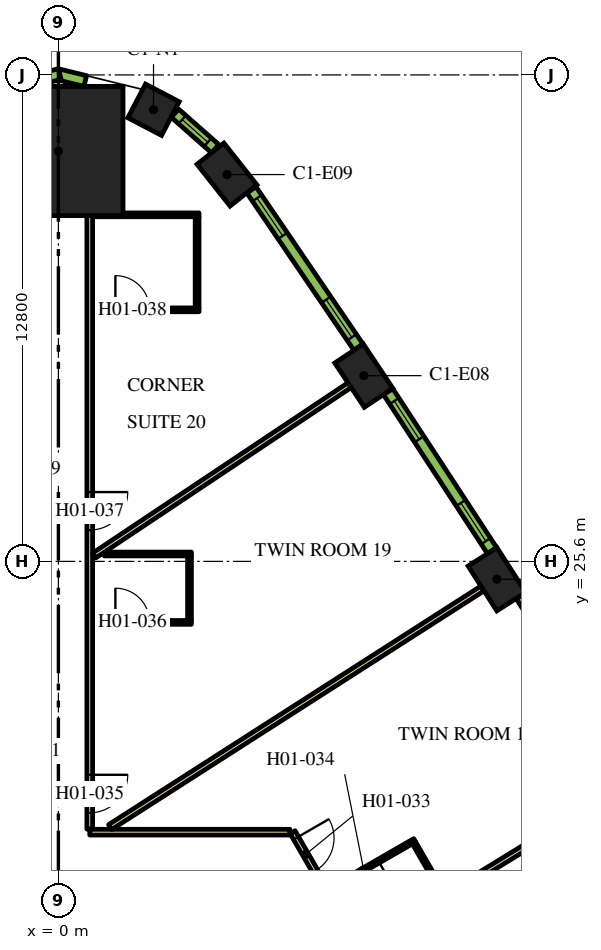
"""IFC4 building model, lengths in metres.
Left out: names, types, materials, properties, quantities, classifications, styles, units other than length and angle.
Written with IfcOpenShell. Run it as: python <this file> out.ifc"""

import sys

from ifc_helpers import new_model, si_unit, direction, frame, frame_2d, origin, origin_2d, place, context, subcontext, project, spatial, rectangle, extrude, element, fill, save


model = new_model("IFC4")
c1 = context("Model", 3, precision=1e-05, world=origin(), true_north=direction((0.0, 1.0)))
c2 = subcontext(c1, "Body", "Model", "MODEL_VIEW")
j1 = project(units=[si_unit("LENGTHUNIT", "METRE"), si_unit("PLANEANGLEUNIT", "RADIAN")], contexts=[c1])
p1 = place(None, origin())
s1 = spatial("IfcSite", under=j1, at=p1, CompositionType="ELEMENT")
p2 = place(p1, origin())
s2 = spatial("IfcBuilding", under=s1, at=p2, CompositionType="ELEMENT")
p3 = place(p2, frame((0.0, 0.0, 27.6)))
s3 = spatial("IfcBuildingStorey", under=s2, at=p3, CompositionType="ELEMENT", Elevation=27.6)
p4 = place(p3, frame((0.0, 36.399, 0.0), z_axis=(0.0, 0.0, 1.0), x_axis=(0.0, 1.0, 0.0)))
e1 = element("IfcColumn", 1, at=p4, inside=s3, PredefinedType="COLUMN", context=c2, shape_type="SweptSolid", body=[
    extrude(rectangle(XDim=3.4, YDim=3.4, at=origin_2d()), origin(), (0.0, 0.0, 1.0), 3.9),
])
for number, where, z_axis, x_axis in (
    (2, (11.539, 25.131, 0.0), (0.0, 0.0, 1.0), (-0.539, 0.842, 0.0)),
    (3, (8.037, 30.487, 0.0), (0.0, 0.0, 1.0), (-0.555, 0.832, 0.0)),
    (4, (4.436, 35.778, 0.0), (0.0, 0.0, 1.0), (-0.62, 0.784, 0.0)),
):
    element("IfcColumn", number, at=place(p3, frame(where, z_axis=z_axis, x_axis=x_axis)), inside=s3, PredefinedType="COLUMN", context=c2, shape_type="SweptSolid", body=[
        extrude(rectangle(XDim=1.4, YDim=0.9, at=origin_2d()), origin(), (0.0, 0.0, 1.0), 3.9),
    ])
p5 = place(p3, frame((2.503, 37.484, 0.0), z_axis=(0.0, 0.0, 1.0), x_axis=(-0.886067695645, 0.463555863661, 0.0)))
e5 = element("IfcColumn", 5, at=p5, inside=s3, PredefinedType="COLUMN", context=c2, shape_type="SweptSolid", body=[
    extrude(rectangle(XDim=1.0, YDim=1.0, at=origin_2d()), origin(), (0.0, 0.0, 1.0), 3.9),
])
p6 = place(p3, frame((6.163, 18.475, 0.0), z_axis=(0.0, 0.0, 1.0), x_axis=(0.500001317485, -0.866024643133, 0.0)))
e6 = element("IfcWall", 6, at=p6, inside=s3, PredefinedType="PARTITIONING", context=c2, shape_type="SweptSolid", body=[
    extrude(rectangle(XDim=25.767, YDim=0.15, at=frame_2d((12.883, 0.0))), origin(), (0.0, 0.0, 1.0), 2.75),
])
p7 = place(p6, frame((24.586, 0.0, 0.0)))
e7 = element("IfcOpeningElement", 7, at=p7, cuts=e6, PredefinedType="OPENING", context=c2, shape_type="SweptSolid", body=[
    extrude(rectangle(XDim=1.0, YDim=2.1, at=frame_2d((0.5, 1.05))), frame((0.0, 0.085, 0.0), z_axis=(0.0, -1.0, 0.0), x_axis=(1.0, 0.0, 0.0)), (0.0, 0.0, 1.0), 0.17),
])
p8 = place(p6, frame((19.319, 0.0, 0.0)))
e8 = element("IfcOpeningElement", 8, at=p8, cuts=e6, PredefinedType="OPENING", context=c2, shape_type="SweptSolid", body=[
    extrude(rectangle(XDim=1.0, YDim=2.1, at=frame_2d((0.5, 1.05))), frame((0.0, 0.085, 0.0), z_axis=(0.0, -1.0, 0.0), x_axis=(1.0, 0.0, 0.0)), (0.0, 0.0, 1.0), 0.17),
])
p9 = place(p6, frame((18.012, 0.0, 0.0)))
e9 = element("IfcOpeningElement", 9, at=p9, cuts=e6, PredefinedType="OPENING", context=c2, shape_type="SweptSolid", body=[
    extrude(rectangle(XDim=1.0, YDim=2.1, at=frame_2d((0.5, 1.05))), frame((0.0, 0.085, 0.0), z_axis=(0.0, -1.0, 0.0), x_axis=(1.0, 0.0, 0.0)), (0.0, 0.0, 1.0), 0.17),
])
p10 = place(p6, frame((6.824, 0.0, 0.0)))
e10 = element("IfcOpeningElement", 10, at=p10, cuts=e6, PredefinedType="OPENING", context=c2, shape_type="SweptSolid", body=[
    extrude(rectangle(XDim=1.1, YDim=2.1, at=frame_2d((0.55, 1.05))), frame((0.0, 0.085, 0.0), z_axis=(0.0, -1.0, 0.0), x_axis=(1.0, 0.0, 0.0)), (0.0, 0.0, 1.0), 0.17),
])
p11 = place(p6, frame((4.658, 0.0, 0.0)))
e11 = element("IfcOpeningElement", 11, at=p11, cuts=e6, PredefinedType="OPENING", context=c2, shape_type="SweptSolid", body=[
    extrude(rectangle(XDim=0.9, YDim=2.1, at=frame_2d((0.45, 1.05))), frame((0.0, 0.085, 0.0), z_axis=(0.0, -1.0, 0.0), x_axis=(1.0, 0.0, 0.0)), (0.0, 0.0, 1.0), 0.17),
])
p12 = place(p6, frame((0.18, 0.0, 0.0)))
e12 = element("IfcOpeningElement", 12, at=p12, cuts=e6, PredefinedType="OPENING", context=c2, shape_type="SweptSolid", body=[
    extrude(rectangle(XDim=1.0, YDim=2.1, at=frame_2d((0.5, 1.05))), frame((0.0, 0.085, 0.0), z_axis=(0.0, -1.0, 0.0), x_axis=(1.0, 0.0, 0.0)), (0.0, 0.0, 1.0), 0.17),
])
p13 = place(p3, frame((0.825, 18.475, 0.0), z_axis=(0.0, 0.0, 1.0), x_axis=(1.0, 0.0, 0.0)))
e13 = element("IfcWall", 13, at=p13, inside=s3, PredefinedType="PARTITIONING", context=c2, shape_type="SweptSolid", body=[
    extrude(rectangle(XDim=5.268, YDim=0.15, at=frame_2d((2.634, 0.0))), origin(), (0.0, 0.0, 1.0), 2.75),
])
p14 = place(p3, frame((0.825, 34.699, 0.0), z_axis=(0.0, 0.0, 1.0), x_axis=(0.0, -1.0, 0.0)))
e14 = element("IfcWall", 14, at=p14, inside=s3, PredefinedType="PARTITIONING", context=c2, shape_type="SweptSolid", body=[
    extrude(rectangle(XDim=16.144, YDim=0.15, at=frame_2d((8.072, 0.0))), origin(), (0.0, 0.0, 1.0), 2.75),
])
p15 = place(p14, frame((14.714, 0.0, 0.0)))
e15 = element("IfcOpeningElement", 15, at=p15, cuts=e14, PredefinedType="OPENING", context=c2, shape_type="SweptSolid", body=[
    extrude(rectangle(XDim=1.0, YDim=2.1, at=frame_2d((0.5, 1.05))), frame((0.0, 0.085, 0.0), z_axis=(0.0, -1.0, 0.0), x_axis=(1.0, 0.0, 0.0)), (0.0, 0.0, 1.0), 0.17),
])
p16 = place(p14, frame((7.275, 0.0, 0.0)))
e16 = element("IfcOpeningElement", 16, at=p16, cuts=e14, PredefinedType="OPENING", context=c2, shape_type="SweptSolid", body=[
    extrude(rectangle(XDim=1.0, YDim=2.1, at=frame_2d((0.5, 1.05))), frame((0.0, 0.085, 0.0), z_axis=(0.0, -1.0, 0.0), x_axis=(1.0, 0.0, 0.0)), (0.0, 0.0, 1.0), 0.17),
])
p17 = place(p3, frame((7.662, 30.238, 0.0), z_axis=(0.0, 0.0, 1.0), x_axis=(-0.831882886825, -0.554951225431, 0.0)))
e17 = element("IfcWall", 17, at=p17, inside=s3, PredefinedType="PARTITIONING", context=c2, shape_type="SweptSolid", body=[
    extrude(rectangle(XDim=8.079, YDim=0.15, at=frame_2d((4.04, 0.0))), origin(), (0.0, 0.0, 1.0), 2.75),
])
p18 = place(p3, frame((11.16, 24.888, 0.0), z_axis=(0.0, 0.0, 1.0), x_axis=(-0.84199813156, -0.539480441211, 0.0)))
e18 = element("IfcWall", 18, at=p18, inside=s3, PredefinedType="PARTITIONING", context=c2, shape_type="SweptSolid", body=[
    extrude(rectangle(XDim=11.638, YDim=0.15, at=frame_2d((5.819, 0.0))), origin(), (0.0, 0.0, 1.0), 2.75),
])
p19 = place(p3, frame((14.558, 19.475, 0.0), z_axis=(0.0, 0.0, 1.0), x_axis=(-0.851829455142, -0.523819223925, 0.0)))
e19 = element("IfcWall", 19, at=p19, inside=s3, PredefinedType="PARTITIONING", context=c2, shape_type="SweptSolid", body=[
    extrude(rectangle(XDim=7.688, YDim=0.15, at=frame_2d((3.844, 0.0))), origin(), (0.0, 0.0, 1.0), 2.75),
])
p20 = place(p3, frame((9.375, 18.261, 0.0), z_axis=(0.0, 0.0, 1.0), x_axis=(-0.866021400173, -0.500006934395, 0.0)))
e20 = element("IfcWall", 20, at=p20, inside=s3, PredefinedType="PARTITIONING", context=c2, shape_type="SweptSolid", body=[
    extrude(rectangle(XDim=2.6, YDim=0.1, at=frame_2d((1.3, 0.0))), origin(), (0.0, 0.0, 1.0), 2.75),
])
p21 = place(p20, frame((1.1, 0.0, 0.0)))
e21 = element("IfcOpeningElement", 21, at=p21, cuts=e20, PredefinedType="OPENING", context=c2, shape_type="SweptSolid", body=[
    extrude(rectangle(XDim=0.9, YDim=2.1, at=frame_2d((0.45, 1.05))), frame((0.0, 0.06, 0.0), z_axis=(0.0, -1.0, 0.0), x_axis=(1.0, 0.0, 0.0)), (0.0, 0.0, 1.0), 0.12),
])
p22 = place(p3, frame((9.357, 18.193, 0.0), z_axis=(0.0, 0.0, 1.0), x_axis=(0.499899694197, -0.866083307622, 0.0)))
e22 = element("IfcWall", 22, at=p22, inside=s3, PredefinedType="PARTITIONING", context=c2, shape_type="SweptSolid", body=[
    extrude(rectangle(XDim=1.55, YDim=0.1, at=frame_2d((0.775, 0.0))), origin(), (0.0, 0.0, 1.0), 2.75),
])
p23 = place(p3, frame((0.9, 23.994, 0.0), z_axis=(0.0, 0.0, 1.0), x_axis=(1.0, 0.0, 0.0)))
e23 = element("IfcWall", 23, at=p23, inside=s3, PredefinedType="PARTITIONING", context=c2, shape_type="SweptSolid", body=[
    extrude(rectangle(XDim=2.6, YDim=0.1, at=frame_2d((1.3, 0.0))), origin(), (0.0, 0.0, 1.0), 2.75),
])
p24 = place(p23, frame((0.6, 0.0, 0.0)))
e24 = element("IfcOpeningElement", 24, at=p24, cuts=e23, PredefinedType="OPENING", context=c2, shape_type="SweptSolid", body=[
    extrude(rectangle(XDim=0.9, YDim=2.1, at=frame_2d((0.45, 1.05))), frame((0.0, 0.06, 0.0), z_axis=(0.0, -1.0, 0.0), x_axis=(1.0, 0.0, 0.0)), (0.0, 0.0, 1.0), 0.12),
])
p25 = place(p3, frame((3.45, 24.044, 0.0), z_axis=(0.0, 0.0, 1.0), x_axis=(0.0, 1.0, 0.0)))
e25 = element("IfcWall", 25, at=p25, inside=s3, PredefinedType="PARTITIONING", context=c2, shape_type="SweptSolid", body=[
    extrude(rectangle(XDim=1.7, YDim=0.1, at=frame_2d((0.85, 0.0))), origin(), (0.0, 0.0, 1.0), 2.75),
])
p26 = place(p3, frame((1.21, 25.794, 0.0), z_axis=(0.0, 0.0, 1.0), x_axis=(1.0, 0.0, 0.0)))
e26 = element("IfcWall", 26, at=p26, inside=s3, PredefinedType="PARTITIONING", context=c2, shape_type="SweptSolid", body=[
    extrude(rectangle(XDim=2.29, YDim=0.1, at=frame_2d((1.145, 0.0))), origin(), (0.0, 0.0, 1.0), 2.75),
])
p27 = place(p3, frame((0.9, 32.219, 0.0), z_axis=(0.0, 0.0, 1.0), x_axis=(1.0, 0.0, 0.0)))
e27 = element("IfcWall", 27, at=p27, inside=s3, PredefinedType="PARTITIONING", context=c2, shape_type="SweptSolid", body=[
    extrude(rectangle(XDim=2.8, YDim=0.1, at=frame_2d((1.4, 0.0))), origin(), (0.0, 0.0, 1.0), 2.75),
])
p28 = place(p27, frame((0.6, 0.0, 0.0)))
e28 = element("IfcOpeningElement", 28, at=p28, cuts=e27, PredefinedType="OPENING", context=c2, shape_type="SweptSolid", body=[
    extrude(rectangle(XDim=0.9, YDim=2.1, at=frame_2d((0.45, 1.05))), frame((0.0, 0.06, 0.0), z_axis=(0.0, -1.0, 0.0), x_axis=(1.0, 0.0, 0.0)), (0.0, 0.0, 1.0), 0.12),
])
p29 = place(p3, frame((3.65, 32.269, 0.0), z_axis=(0.0, 0.0, 1.0), x_axis=(0.0, 1.0, 0.0)))
e29 = element("IfcWall", 29, at=p29, inside=s3, PredefinedType="PARTITIONING", context=c2, shape_type="SweptSolid", body=[
    extrude(rectangle(XDim=2.4, YDim=0.1, at=frame_2d((1.2, 0.0))), origin(), (0.0, 0.0, 1.0), 2.75),
])
p30 = place(p3, frame((0.9, 34.719, 0.0), z_axis=(0.0, 0.0, 1.0), x_axis=(1.0, 0.0, 0.0)))
e30 = element("IfcWall", 30, at=p30, inside=s3, PredefinedType="PARTITIONING", context=c2, shape_type="SweptSolid", body=[
    extrude(rectangle(XDim=2.8, YDim=0.1, at=frame_2d((1.4, 0.0))), origin(), (0.0, 0.0, 1.0), 2.75),
])
p31 = place(p3, frame((14.827, 20.466, 0.0), z_axis=(0.0, 0.0, 1.0), x_axis=(-0.531688286542, 0.846940119462, 0.0)))
e31 = element("IfcWall", 31, at=p31, inside=s3, PredefinedType="SOLIDWALL", context=c2, shape_type="SweptSolid", body=[
    extrude(rectangle(XDim=4.998, YDim=0.29, at=frame_2d((2.499, 0.0))), origin(), (0.0, 0.0, 1.0), 3.65),
])
p32 = place(p31, frame((0.297, 0.0, 0.9)))
e32 = element("IfcOpeningElement", 32, at=p32, cuts=e31, PredefinedType="OPENING", context=c2, shape_type="SweptSolid", body=[
    extrude(rectangle(XDim=1.2, YDim=2.15, at=frame_2d((0.6, 1.075))), frame((0.0, 0.155, 0.0), z_axis=(0.0, -1.0, 0.0), x_axis=(1.0, 0.0, 0.0)), (0.0, 0.0, 1.0), 0.31),
])
p33 = place(p31, frame((3.501, 0.0, 0.9)))
e33 = element("IfcOpeningElement", 33, at=p33, cuts=e31, PredefinedType="OPENING", context=c2, shape_type="SweptSolid", body=[
    extrude(rectangle(XDim=1.2, YDim=2.15, at=frame_2d((0.6, 1.075))), frame((0.0, 0.155, 0.0), z_axis=(0.0, -1.0, 0.0), x_axis=(1.0, 0.0, 0.0)), (0.0, 0.0, 1.0), 0.31),
])
p34 = place(p3, frame((11.411, 25.884, 0.0), z_axis=(0.0, 0.0, 1.0), x_axis=(-0.547204617628, 0.836998868845, 0.0)))
e34 = element("IfcWall", 34, at=p34, inside=s3, PredefinedType="SOLIDWALL", context=c2, shape_type="SweptSolid", body=[
    extrude(rectangle(XDim=4.998, YDim=0.29, at=frame_2d((2.499, 0.0))), origin(), (0.0, 0.0, 1.0), 3.65),
])
p35 = place(p34, frame((0.297, 0.0, 0.9)))
e35 = element("IfcOpeningElement", 35, at=p35, cuts=e34, PredefinedType="OPENING", context=c2, shape_type="SweptSolid", body=[
    extrude(rectangle(XDim=1.2, YDim=2.15, at=frame_2d((0.6, 1.075))), frame((0.0, 0.155, 0.0), z_axis=(0.0, -1.0, 0.0), x_axis=(1.0, 0.0, 0.0)), (0.0, 0.0, 1.0), 0.31),
])
p36 = place(p34, frame((3.501, 0.0, 0.9)))
e36 = element("IfcOpeningElement", 36, at=p36, cuts=e34, PredefinedType="OPENING", context=c2, shape_type="SweptSolid", body=[
    extrude(rectangle(XDim=1.2, YDim=2.15, at=frame_2d((0.6, 1.075))), frame((0.0, 0.155, 0.0), z_axis=(0.0, -1.0, 0.0), x_axis=(1.0, 0.0, 0.0)), (0.0, 0.0, 1.0), 0.31),
])
p37 = place(p3, frame((7.895, 31.238, 0.0), z_axis=(0.0, 0.0, 1.0), x_axis=(-0.562610153679, 0.826722332454, 0.0)))
e37 = element("IfcWall", 37, at=p37, inside=s3, PredefinedType="SOLIDWALL", context=c2, shape_type="SweptSolid", body=[
    extrude(rectangle(XDim=5.006, YDim=0.29, at=frame_2d((2.503, 0.0))), origin(), (0.0, 0.0, 1.0), 3.65),
])
p38 = place(p37, frame((0.31, 0.0, 0.9)))
e38 = element("IfcOpeningElement", 38, at=p38, cuts=e37, PredefinedType="OPENING", context=c2, shape_type="SweptSolid", body=[
    extrude(rectangle(XDim=1.2, YDim=2.15, at=frame_2d((0.6, 1.075))), frame((0.0, 0.155, 0.0), z_axis=(0.0, -1.0, 0.0), x_axis=(1.0, 0.0, 0.0)), (0.0, 0.0, 1.0), 0.31),
])
p39 = place(p37, frame((3.541, 0.0, 0.9)))
e39 = element("IfcOpeningElement", 39, at=p39, cuts=e37, PredefinedType="OPENING", context=c2, shape_type="SweptSolid", body=[
    extrude(rectangle(XDim=1.2, YDim=2.15, at=frame_2d((0.6, 1.075))), frame((0.0, 0.155, 0.0), z_axis=(0.0, -1.0, 0.0), x_axis=(1.0, 0.0, 0.0)), (0.0, 0.0, 1.0), 0.31),
])
p40 = place(p3, frame((4.125, 36.459, 0.0), z_axis=(0.0, 0.0, 1.0), x_axis=(-0.749812680302, 0.661650167731, 0.0)))
e40 = element("IfcWall", 40, at=p40, inside=s3, PredefinedType="SOLIDWALL", context=c2, shape_type="SweptSolid", body=[
    extrude(rectangle(XDim=1.415, YDim=0.29, at=frame_2d((0.708, 0.0))), origin(), (0.0, 0.0, 1.0), 3.65),
])
p41 = place(p40, frame((0.258, 0.0, 0.9)))
e41 = element("IfcOpeningElement", 41, at=p41, cuts=e40, PredefinedType="OPENING", context=c2, shape_type="SweptSolid", body=[
    extrude(rectangle(XDim=0.9, YDim=2.15, at=frame_2d((0.45, 1.075))), frame((0.0, 0.155, 0.0), z_axis=(0.0, -1.0, 0.0), x_axis=(1.0, 0.0, 0.0)), (0.0, 0.0, 1.0), 0.31),
])
for number, where, z_axis, x_axis in (
    (42, (0.707, 38.239, 0.0), (0.0, 0.0, 1.0), (-0.971, 0.238, 0.0)),
    (43, (0.035, 38.421, 0.0), (0.0, 0.0, 1.0), (-0.971, -0.238, 0.0)),
):
    element("IfcWall", number, at=place(p3, frame(where, z_axis=z_axis, x_axis=x_axis)), inside=s3, PredefinedType="SOLIDWALL", context=c2, shape_type="SweptSolid", body=[
        extrude(rectangle(XDim=0.764, YDim=0.29, at=frame_2d((0.382, 0.0))), origin(), (0.0, 0.0, 1.0), 3.65),
    ])
p42 = place(p12, origin())
e44 = element("IfcDoor", 44, at=p42, inside=s3, OperationType="SINGLE_SWING_LEFT", PredefinedType="DOOR", context=c2, shape_type="SweptSolid", body=[
    extrude(rectangle(XDim=1.0, YDim=2.1, at=frame_2d((0.5, 1.05))), frame((0.0, 0.025, 0.0), z_axis=(0.0, -1.0, 0.0), x_axis=(1.0, 0.0, 0.0)), (0.0, 0.0, 1.0), 0.05),
])
fill(e12, e44)
p43 = place(p21, origin())
e45 = element("IfcDoor", 45, at=p43, inside=s3, OperationType="SINGLE_SWING_RIGHT", PredefinedType="DOOR", context=c2, shape_type="SweptSolid", body=[
    extrude(rectangle(XDim=0.9, YDim=2.1, at=frame_2d((0.45, 1.05))), frame((0.0, 0.025, 0.0), z_axis=(0.0, -1.0, 0.0), x_axis=(1.0, 0.0, 0.0)), (0.0, 0.0, 1.0), 0.05),
])
fill(e21, e45)
p44 = place(p15, origin())
e46 = element("IfcDoor", 46, at=p44, inside=s3, OperationType="SINGLE_SWING_RIGHT", PredefinedType="DOOR", context=c2, shape_type="SweptSolid", body=[
    extrude(rectangle(XDim=1.0, YDim=2.1, at=frame_2d((0.5, 1.05))), frame((0.0, 0.025, 0.0), z_axis=(0.0, -1.0, 0.0), x_axis=(1.0, 0.0, 0.0)), (0.0, 0.0, 1.0), 0.05),
])
fill(e15, e46)
p45 = place(p24, origin())
e47 = element("IfcDoor", 47, at=p45, inside=s3, OperationType="SINGLE_SWING_LEFT", PredefinedType="DOOR", context=c2, shape_type="SweptSolid", body=[
    extrude(rectangle(XDim=0.9, YDim=2.1, at=frame_2d((0.45, 1.05))), frame((0.0, 0.025, 0.0), z_axis=(0.0, -1.0, 0.0), x_axis=(1.0, 0.0, 0.0)), (0.0, 0.0, 1.0), 0.05),
])
fill(e24, e47)
p46 = place(p16, origin())
e48 = element("IfcDoor", 48, at=p46, inside=s3, OperationType="SINGLE_SWING_RIGHT", PredefinedType="DOOR", context=c2, shape_type="SweptSolid", body=[
    extrude(rectangle(XDim=1.0, YDim=2.1, at=frame_2d((0.5, 1.05))), frame((0.0, 0.025, 0.0), z_axis=(0.0, -1.0, 0.0), x_axis=(1.0, 0.0, 0.0)), (0.0, 0.0, 1.0), 0.05),
])
fill(e16, e48)
p47 = place(p28, origin())
e49 = element("IfcDoor", 49, at=p47, inside=s3, OperationType="SINGLE_SWING_LEFT", PredefinedType="DOOR", context=c2, shape_type="SweptSolid", body=[
    extrude(rectangle(XDim=0.9, YDim=2.1, at=frame_2d((0.45, 1.05))), frame((0.0, 0.025, 0.0), z_axis=(0.0, -1.0, 0.0), x_axis=(1.0, 0.0, 0.0)), (0.0, 0.0, 1.0), 0.05),
])
fill(e28, e49)
p48 = place(p35, origin())
e50 = element("IfcWindow", 50, at=p48, inside=s3, PartitioningType="DOUBLE_PANEL_VERTICAL", PredefinedType="WINDOW", context=c2, shape_type="SweptSolid", body=[
    extrude(rectangle(XDim=1.2, YDim=2.15, at=frame_2d((0.6, 1.075))), frame((0.0, 0.015, 0.0), z_axis=(0.0, -1.0, 0.0), x_axis=(1.0, 0.0, 0.0)), (0.0, 0.0, 1.0), 0.06),
])
fill(e35, e50)
p49 = place(p36, origin())
e51 = element("IfcWindow", 51, at=p49, inside=s3, PartitioningType="DOUBLE_PANEL_VERTICAL", PredefinedType="WINDOW", context=c2, shape_type="SweptSolid", body=[
    extrude(rectangle(XDim=1.2, YDim=2.15, at=frame_2d((0.6, 1.075))), frame((0.0, 0.015, 0.0), z_axis=(0.0, -1.0, 0.0), x_axis=(1.0, 0.0, 0.0)), (0.0, 0.0, 1.0), 0.06),
])
fill(e36, e51)
p50 = place(p38, origin())
e52 = element("IfcWindow", 52, at=p50, inside=s3, PartitioningType="DOUBLE_PANEL_VERTICAL", PredefinedType="WINDOW", context=c2, shape_type="SweptSolid", body=[
    extrude(rectangle(XDim=1.2, YDim=2.15, at=frame_2d((0.6, 1.075))), frame((0.0, 0.015, 0.0), z_axis=(0.0, -1.0, 0.0), x_axis=(1.0, 0.0, 0.0)), (0.0, 0.0, 1.0), 0.06),
])
fill(e38, e52)
p51 = place(p39, origin())
e53 = element("IfcWindow", 53, at=p51, inside=s3, PartitioningType="DOUBLE_PANEL_VERTICAL", PredefinedType="WINDOW", context=c2, shape_type="SweptSolid", body=[
    extrude(rectangle(XDim=1.2, YDim=2.15, at=frame_2d((0.6, 1.075))), frame((0.0, 0.015, 0.0), z_axis=(0.0, -1.0, 0.0), x_axis=(1.0, 0.0, 0.0)), (0.0, 0.0, 1.0), 0.06),
])
fill(e39, e53)
p52 = place(p41, origin())
e54 = element("IfcWindow", 54, at=p52, inside=s3, PartitioningType="SINGLE_PANEL", PredefinedType="WINDOW", context=c2, shape_type="SweptSolid", body=[
    extrude(rectangle(XDim=0.9, YDim=2.15, at=frame_2d((0.45, 1.075))), frame((0.0, 0.015, 0.0), z_axis=(0.0, -1.0, 0.0), x_axis=(1.0, 0.0, 0.0)), (0.0, 0.0, 1.0), 0.06),
])
fill(e41, e54)
save(model, sys.argv[1])
